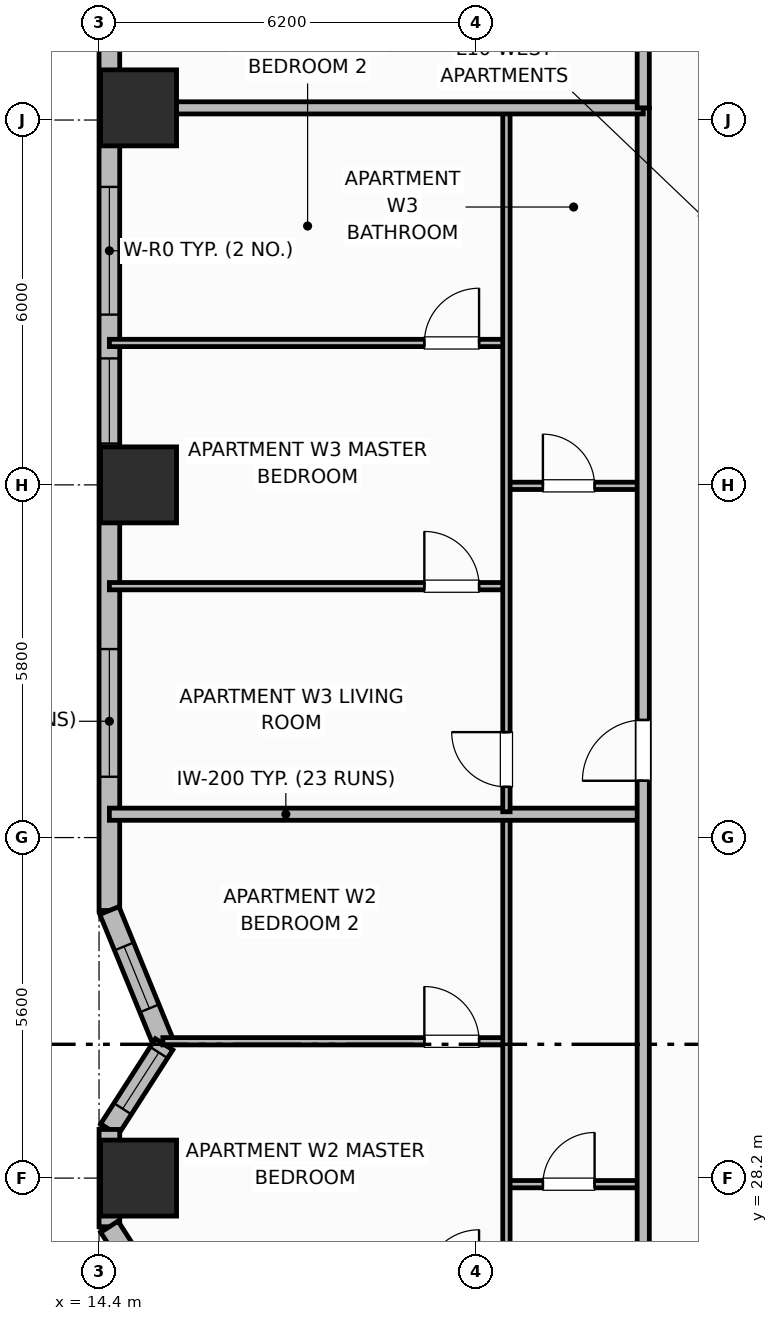
"""IFC4 building model, lengths in metres.
Left out: names, types, materials, properties, quantities, classifications, styles, units other than length and angle.
Written with IfcOpenShell. Run it as: python <this file> out.ifc"""

import sys

from ifc_helpers import new_model, si_unit, direction, frame, frame_2d, origin, origin_2d, place, context, subcontext, project, spatial, rectangle, extrude, element, fill, save


model = new_model("IFC4")
c1 = context("Model", 3, precision=1e-05, world=origin(), true_north=direction((0.0, 1.0)))
c2 = subcontext(c1, "Body", "Model", "MODEL_VIEW")
j1 = project(units=[si_unit("LENGTHUNIT", "METRE"), si_unit("PLANEANGLEUNIT", "RADIAN")], contexts=[c1])
p1 = place(None, origin())
s1 = spatial("IfcSite", under=j1, at=p1, CompositionType="ELEMENT")
p2 = place(p1, origin())
s2 = spatial("IfcBuilding", under=s1, at=p2, CompositionType="ELEMENT")
p3 = place(p2, frame((0.0, 0.0, 43.6)))
s3 = spatial("IfcBuildingStorey", under=s2, at=p3, CompositionType="ELEMENT", Elevation=43.6)
for number, where, z_axis, x_axis in (
    (1, (15.05, 28.2, 0.0), (0.0, 0.0, 1.0), (1.0, 0.0, 0.0)),
    (2, (15.05, 39.6, 0.0), (0.0, 0.0, 1.0), (1.0, 0.0, 0.0)),
    (3, (15.05, 45.8, 0.0), (0.0, 0.0, 1.0), (1.0, 0.0, 0.0)),
):
    element("IfcColumn", number, at=place(p3, frame(where, z_axis=z_axis, x_axis=x_axis)), inside=s3, PredefinedType="COLUMN", context=c2, shape_type="SweptSolid", body=[
        extrude(rectangle(XDim=1.25, YDim=1.25, at=origin_2d()), origin(), (0.0, 0.0, 1.0), 3.7),
    ])
p4 = place(p3, frame((14.57, 47.4, 0.0), z_axis=(0.0, 0.0, 1.0), x_axis=(0.0, -1.0, 0.0)))
e4 = element("IfcWall", 4, at=p4, inside=s3, PredefinedType="SOLIDWALL", context=c2, shape_type="SweptSolid", body=[
    extrude(rectangle(XDim=14.8, YDim=0.34, at=frame_2d((7.4, 0.0))), origin(), (0.0, 0.0, 1.0), 2.7),
])
p5 = place(p4, frame((2.9, 0.0, 0.68)))
e5 = element("IfcOpeningElement", 5, at=p5, cuts=e4, PredefinedType="OPENING", context=c2, shape_type="SweptSolid", body=[
    extrude(rectangle(XDim=2.1, YDim=1.9, at=frame_2d((1.05, 0.95))), frame((0.0, 0.18, 0.0), z_axis=(0.0, -1.0, 0.0), x_axis=(1.0, 0.0, 0.0)), (0.0, 0.0, 1.0), 0.36),
])
p6 = place(p4, frame((5.72, 0.0, 0.69)))
e6 = element("IfcOpeningElement", 6, at=p6, cuts=e4, PredefinedType="OPENING", context=c2, shape_type="SweptSolid", body=[
    extrude(rectangle(XDim=1.4, YDim=1.85, at=frame_2d((0.7, 0.925))), frame((0.0, 0.18, 0.0), z_axis=(0.0, -1.0, 0.0), x_axis=(1.0, 0.0, 0.0)), (0.0, 0.0, 1.0), 0.36),
])
p7 = place(p4, frame((10.5, 0.0, 0.68)))
e7 = element("IfcOpeningElement", 7, at=p7, cuts=e4, PredefinedType="OPENING", context=c2, shape_type="SweptSolid", body=[
    extrude(rectangle(XDim=2.1, YDim=1.9, at=frame_2d((1.05, 0.95))), frame((0.0, 0.18, 0.0), z_axis=(0.0, -1.0, 0.0), x_axis=(1.0, 0.0, 0.0)), (0.0, 0.0, 1.0), 0.36),
])
p8 = place(p3, frame((14.57, 32.6, 0.0), z_axis=(0.0, 0.0, 1.0), x_axis=(0.378568858991, -0.925573130013, 0.0)))
e8 = element("IfcWall", 8, at=p8, inside=s3, PredefinedType="SOLIDWALL", context=c2, shape_type="SweptSolid", body=[
    extrude(rectangle(XDim=2.377, YDim=0.34, at=frame_2d((1.188, 0.0))), origin(), (0.0, 0.0, 1.0), 2.7),
])
p9 = place(p8, frame((0.638, 0.0, 0.89)))
e9 = element("IfcOpeningElement", 9, at=p9, cuts=e8, PredefinedType="OPENING", context=c2, shape_type="SweptSolid", body=[
    extrude(rectangle(XDim=1.1, YDim=1.65, at=frame_2d((0.55, 0.825))), frame((0.0, 0.18, 0.0), z_axis=(0.0, -1.0, 0.0), x_axis=(1.0, 0.0, 0.0)), (0.0, 0.0, 1.0), 0.36),
])
p10 = place(p3, frame((15.47, 30.4, 0.0), z_axis=(0.0, 0.0, 1.0), x_axis=(-0.540742762169, -0.841188008214, 0.0)))
e10 = element("IfcWall", 10, at=p10, inside=s3, PredefinedType="SOLIDWALL", context=c2, shape_type="SweptSolid", body=[
    extrude(rectangle(XDim=1.664, YDim=0.34, at=frame_2d((0.832, 0.0))), origin(), (0.0, 0.0, 1.0), 2.7),
])
p11 = place(p10, frame((0.16, 0.0, 0.89)))
e11 = element("IfcOpeningElement", 11, at=p11, cuts=e10, PredefinedType="OPENING", context=c2, shape_type="SweptSolid", body=[
    extrude(rectangle(XDim=1.1, YDim=1.65, at=frame_2d((0.55, 0.825))), frame((0.0, 0.18, 0.0), z_axis=(0.0, -1.0, 0.0), x_axis=(1.0, 0.0, 0.0)), (0.0, 0.0, 1.0), 0.36),
])
p12 = place(p3, frame((14.57, 29.0, 0.0), z_axis=(0.0, 0.0, 1.0), x_axis=(0.0, -1.0, 0.0)))
e12 = element("IfcWall", 12, at=p12, inside=s3, PredefinedType="SOLIDWALL", context=c2, shape_type="SweptSolid", body=[
    extrude(rectangle(XDim=1.6, YDim=0.34, at=frame_2d((0.8, 0.0))), origin(), (0.0, 0.0, 1.0), 2.7),
])
p13 = place(p3, frame((14.57, 27.4, 0.0), z_axis=(0.0, 0.0, 1.0), x_axis=(0.540742762169, -0.841188008214, 0.0)))
e13 = element("IfcWall", 13, at=p13, inside=s3, PredefinedType="SOLIDWALL", context=c2, shape_type="SweptSolid", body=[
    extrude(rectangle(XDim=1.664, YDim=0.34, at=frame_2d((0.832, 0.0))), origin(), (0.0, 0.0, 1.0), 2.7),
])
p14 = place(p3, frame((21.1, 28.1, 0.0), z_axis=(0.0, 0.0, 1.0), x_axis=(1.0, 0.0, 0.0)))
e14 = element("IfcWall", 14, at=p14, inside=s3, PredefinedType="PARTITIONING", context=c2, shape_type="SweptSolid", body=[
    extrude(rectangle(XDim=2.25, YDim=0.12, at=frame_2d((1.125, 0.0))), origin(), (0.0, 0.0, 1.0), 2.53),
])
p15 = place(p14, frame((0.6, 0.0, 0.0)))
e15 = element("IfcOpeningElement", 15, at=p15, cuts=e14, PredefinedType="OPENING", context=c2, shape_type="SweptSolid", body=[
    extrude(rectangle(XDim=0.85, YDim=2.1, at=frame_2d((0.425, 1.05))), frame((0.0, 0.07, 0.0), z_axis=(0.0, -1.0, 0.0), x_axis=(1.0, 0.0, 0.0)), (0.0, 0.0, 1.0), 0.14),
])
p16 = place(p3, frame((15.449, 30.45, 0.0), z_axis=(0.0, 0.0, 1.0), x_axis=(1.0, 0.0, 0.0)))
e16 = element("IfcWall", 16, at=p16, inside=s3, PredefinedType="PARTITIONING", context=c2, shape_type="SweptSolid", body=[
    extrude(rectangle(XDim=5.651, YDim=0.12, at=frame_2d((2.825, 0.0))), origin(), (0.0, 0.0, 1.0), 2.53),
])
p17 = place(p16, frame((4.301, 0.0, 0.0)))
e17 = element("IfcOpeningElement", 17, at=p17, cuts=e16, PredefinedType="OPENING", context=c2, shape_type="SweptSolid", body=[
    extrude(rectangle(XDim=0.9, YDim=2.1, at=frame_2d((0.45, 1.05))), frame((0.0, 0.07, 0.0), z_axis=(0.0, -1.0, 0.0), x_axis=(1.0, 0.0, 0.0)), (0.0, 0.0, 1.0), 0.14),
])
p18 = place(p3, frame((21.1, 22.74, 0.0), z_axis=(0.0, 0.0, 1.0), x_axis=(0.0, 1.0, 0.0)))
e18 = element("IfcWall", 18, at=p18, inside=s3, PredefinedType="PARTITIONING", context=c2, shape_type="SweptSolid", body=[
    extrude(rectangle(XDim=11.404, YDim=0.12, at=frame_2d((5.702, 0.0))), origin(), (0.0, 0.0, 1.0), 2.53),
])
p19 = place(p18, frame((0.41, 0.0, 0.0)))
e19 = element("IfcOpeningElement", 19, at=p19, cuts=e18, PredefinedType="OPENING", context=c2, shape_type="SweptSolid", body=[
    extrude(rectangle(XDim=0.9, YDim=2.1, at=frame_2d((0.45, 1.05))), frame((0.0, 0.07, 0.0), z_axis=(0.0, -1.0, 0.0), x_axis=(1.0, 0.0, 0.0)), (0.0, 0.0, 1.0), 0.14),
])
p20 = place(p3, frame((14.57, 34.184, 0.0), z_axis=(0.0, 0.0, 1.0), x_axis=(1.0, 0.0, 0.0)))
e20 = element("IfcWall", 20, at=p20, inside=s3, PredefinedType="PARTITIONING", context=c2, shape_type="SweptSolid", body=[
    extrude(rectangle(XDim=8.78, YDim=0.2, at=frame_2d((4.39, 0.0))), origin(), (0.0, 0.0, 1.0), 2.53),
])
p21 = place(p3, frame((21.1, 39.584, 0.0), z_axis=(0.0, 0.0, 1.0), x_axis=(1.0, 0.0, 0.0)))
e21 = element("IfcWall", 21, at=p21, inside=s3, PredefinedType="PARTITIONING", context=c2, shape_type="SweptSolid", body=[
    extrude(rectangle(XDim=2.25, YDim=0.12, at=frame_2d((1.125, 0.0))), origin(), (0.0, 0.0, 1.0), 2.53),
])
p22 = place(p21, frame((0.6, 0.0, 0.0)))
e22 = element("IfcOpeningElement", 22, at=p22, cuts=e21, PredefinedType="OPENING", context=c2, shape_type="SweptSolid", body=[
    extrude(rectangle(XDim=0.85, YDim=2.1, at=frame_2d((0.425, 1.05))), frame((0.0, 0.07, 0.0), z_axis=(0.0, -1.0, 0.0), x_axis=(1.0, 0.0, 0.0)), (0.0, 0.0, 1.0), 0.14),
])
p23 = place(p3, frame((14.57, 37.934, 0.0), z_axis=(0.0, 0.0, 1.0), x_axis=(1.0, 0.0, 0.0)))
e23 = element("IfcWall", 23, at=p23, inside=s3, PredefinedType="PARTITIONING", context=c2, shape_type="SweptSolid", body=[
    extrude(rectangle(XDim=6.53, YDim=0.12, at=frame_2d((3.265, 0.0))), origin(), (0.0, 0.0, 1.0), 2.53),
])
p24 = place(p23, frame((5.18, 0.0, 0.0)))
e24 = element("IfcOpeningElement", 24, at=p24, cuts=e23, PredefinedType="OPENING", context=c2, shape_type="SweptSolid", body=[
    extrude(rectangle(XDim=0.9, YDim=2.1, at=frame_2d((0.45, 1.05))), frame((0.0, 0.07, 0.0), z_axis=(0.0, -1.0, 0.0), x_axis=(1.0, 0.0, 0.0)), (0.0, 0.0, 1.0), 0.14),
])
p25 = place(p3, frame((14.57, 41.934, 0.0), z_axis=(0.0, 0.0, 1.0), x_axis=(1.0, 0.0, 0.0)))
e25 = element("IfcWall", 25, at=p25, inside=s3, PredefinedType="PARTITIONING", context=c2, shape_type="SweptSolid", body=[
    extrude(rectangle(XDim=6.53, YDim=0.12, at=frame_2d((3.265, 0.0))), origin(), (0.0, 0.0, 1.0), 2.53),
])
p26 = place(p25, frame((5.18, 0.0, 0.0)))
e26 = element("IfcOpeningElement", 26, at=p26, cuts=e25, PredefinedType="OPENING", context=c2, shape_type="SweptSolid", body=[
    extrude(rectangle(XDim=0.9, YDim=2.1, at=frame_2d((0.45, 1.05))), frame((0.0, 0.07, 0.0), z_axis=(0.0, -1.0, 0.0), x_axis=(1.0, 0.0, 0.0)), (0.0, 0.0, 1.0), 0.14),
])
p27 = place(p3, frame((21.1, 34.224, 0.0), z_axis=(0.0, 0.0, 1.0), x_axis=(0.0, 1.0, 0.0)))
e27 = element("IfcWall", 27, at=p27, inside=s3, PredefinedType="PARTITIONING", context=c2, shape_type="SweptSolid", body=[
    extrude(rectangle(XDim=11.536, YDim=0.12, at=frame_2d((5.768, 0.0))), origin(), (0.0, 0.0, 1.0), 2.53),
])
p28 = place(p27, frame((0.41, 0.0, 0.0)))
e28 = element("IfcOpeningElement", 28, at=p28, cuts=e27, PredefinedType="OPENING", context=c2, shape_type="SweptSolid", body=[
    extrude(rectangle(XDim=0.9, YDim=2.1, at=frame_2d((0.45, 1.05))), frame((0.0, 0.07, 0.0), z_axis=(0.0, -1.0, 0.0), x_axis=(1.0, 0.0, 0.0)), (0.0, 0.0, 1.0), 0.14),
])
p29 = place(p3, frame((23.35, 10.6, 0.0), z_axis=(0.0, 0.0, 1.0), x_axis=(0.0, 1.0, 0.0)))
e29 = element("IfcWall", 29, at=p29, inside=s3, PredefinedType="PARTITIONING", context=c2, shape_type="SweptSolid", body=[
    extrude(rectangle(XDim=35.2, YDim=0.2, at=frame_2d((17.6, 0.0))), origin(), (0.0, 0.0, 1.0), 2.53),
])
p30 = place(p29, frame((2.65, 0.0, 0.0)))
e30 = element("IfcOpeningElement", 30, at=p30, cuts=e29, PredefinedType="OPENING", context=c2, shape_type="SweptSolid", body=[
    extrude(rectangle(XDim=1.0, YDim=2.15, at=frame_2d((0.5, 1.075))), frame((0.0, 0.11, 0.0), z_axis=(0.0, -1.0, 0.0), x_axis=(1.0, 0.0, 0.0)), (0.0, 0.0, 1.0), 0.22),
])
p31 = place(p29, frame((12.65, 0.0, 0.0)))
e31 = element("IfcOpeningElement", 31, at=p31, cuts=e29, PredefinedType="OPENING", context=c2, shape_type="SweptSolid", body=[
    extrude(rectangle(XDim=1.0, YDim=2.15, at=frame_2d((0.5, 1.075))), frame((0.0, 0.11, 0.0), z_axis=(0.0, -1.0, 0.0), x_axis=(1.0, 0.0, 0.0)), (0.0, 0.0, 1.0), 0.22),
])
p32 = place(p29, frame((24.134, 0.0, 0.0)))
e32 = element("IfcOpeningElement", 32, at=p32, cuts=e29, PredefinedType="OPENING", context=c2, shape_type="SweptSolid", body=[
    extrude(rectangle(XDim=1.0, YDim=2.15, at=frame_2d((0.5, 1.075))), frame((0.0, 0.11, 0.0), z_axis=(0.0, -1.0, 0.0), x_axis=(1.0, 0.0, 0.0)), (0.0, 0.0, 1.0), 0.22),
])
p33 = place(p3, frame((14.99, 45.8, 0.0), z_axis=(0.0, 0.0, 1.0), x_axis=(1.0, 0.0, 0.0)))
e33 = element("IfcWall", 33, at=p33, inside=s3, PredefinedType="PARTITIONING", context=c2, shape_type="SweptSolid", body=[
    extrude(rectangle(XDim=8.36, YDim=0.2, at=frame_2d((4.18, 0.0))), origin(), (0.0, 0.0, 1.0), 2.53),
])
p34 = place(p3, frame((23.35, 45.8, 0.0), z_axis=(0.0, 0.0, 1.0), x_axis=(0.0, 1.0, 0.0)))
e34 = element("IfcWall", 34, at=p34, inside=s3, PredefinedType="PARTITIONING", context=c2, shape_type="SweptSolid", body=[
    extrude(rectangle(XDim=5.63, YDim=0.2, at=frame_2d((2.815, 0.0))), origin(), (0.0, 0.0, 1.0), 2.53),
])
p35 = place(p5, origin())
e35 = element("IfcWindow", 35, at=p35, inside=s3, PartitioningType="SINGLE_PANEL", PredefinedType="WINDOW", context=c2, shape_type="SweptSolid", body=[
    extrude(rectangle(XDim=2.1, YDim=1.9, at=frame_2d((1.05, 0.95))), frame((0.0, 0.03, 0.0), z_axis=(0.0, -1.0, 0.0), x_axis=(1.0, 0.0, 0.0)), (0.0, 0.0, 1.0), 0.06),
])
fill(e5, e35)
p36 = place(p6, origin())
e36 = element("IfcWindow", 36, at=p36, inside=s3, PartitioningType="SINGLE_PANEL", PredefinedType="WINDOW", context=c2, shape_type="SweptSolid", body=[
    extrude(rectangle(XDim=1.4, YDim=1.85, at=frame_2d((0.7, 0.925))), frame((0.0, 0.03, 0.0), z_axis=(0.0, -1.0, 0.0), x_axis=(1.0, 0.0, 0.0)), (0.0, 0.0, 1.0), 0.06),
])
fill(e6, e36)
p37 = place(p7, origin())
e37 = element("IfcWindow", 37, at=p37, inside=s3, PartitioningType="SINGLE_PANEL", PredefinedType="WINDOW", context=c2, shape_type="SweptSolid", body=[
    extrude(rectangle(XDim=2.1, YDim=1.9, at=frame_2d((1.05, 0.95))), frame((0.0, 0.03, 0.0), z_axis=(0.0, -1.0, 0.0), x_axis=(1.0, 0.0, 0.0)), (0.0, 0.0, 1.0), 0.06),
])
fill(e7, e37)
p38 = place(p9, origin())
e38 = element("IfcWindow", 38, at=p38, inside=s3, PartitioningType="SINGLE_PANEL", PredefinedType="WINDOW", context=c2, shape_type="SweptSolid", body=[
    extrude(rectangle(XDim=1.1, YDim=1.65, at=frame_2d((0.55, 0.825))), frame((0.0, 0.03, 0.0), z_axis=(0.0, -1.0, 0.0), x_axis=(1.0, 0.0, 0.0)), (0.0, 0.0, 1.0), 0.06),
])
fill(e9, e38)
p39 = place(p11, origin())
e39 = element("IfcWindow", 39, at=p39, inside=s3, PartitioningType="SINGLE_PANEL", PredefinedType="WINDOW", context=c2, shape_type="SweptSolid", body=[
    extrude(rectangle(XDim=1.1, YDim=1.65, at=frame_2d((0.55, 0.825))), frame((0.0, 0.03, 0.0), z_axis=(0.0, -1.0, 0.0), x_axis=(1.0, 0.0, 0.0)), (0.0, 0.0, 1.0), 0.06),
])
fill(e11, e39)
p40 = place(p15, origin())
e40 = element("IfcDoor", 40, at=p40, inside=s3, OperationType="SINGLE_SWING_RIGHT", PredefinedType="DOOR", context=c2, shape_type="SweptSolid", body=[
    extrude(rectangle(XDim=0.85, YDim=2.1, at=frame_2d((0.425, 1.05))), frame((0.0, 0.025, 0.0), z_axis=(0.0, -1.0, 0.0), x_axis=(1.0, 0.0, 0.0)), (0.0, 0.0, 1.0), 0.05),
])
fill(e15, e40)
p41 = place(p17, origin())
e41 = element("IfcDoor", 41, at=p41, inside=s3, OperationType="SINGLE_SWING_LEFT", PredefinedType="DOOR", context=c2, shape_type="SweptSolid", body=[
    extrude(rectangle(XDim=0.9, YDim=2.1, at=frame_2d((0.45, 1.05))), frame((0.0, 0.025, 0.0), z_axis=(0.0, -1.0, 0.0), x_axis=(1.0, 0.0, 0.0)), (0.0, 0.0, 1.0), 0.05),
])
fill(e17, e41)
p42 = place(p22, origin())
e42 = element("IfcDoor", 42, at=p42, inside=s3, OperationType="SINGLE_SWING_LEFT", PredefinedType="DOOR", context=c2, shape_type="SweptSolid", body=[
    extrude(rectangle(XDim=0.85, YDim=2.1, at=frame_2d((0.425, 1.05))), frame((0.0, 0.025, 0.0), z_axis=(0.0, -1.0, 0.0), x_axis=(1.0, 0.0, 0.0)), (0.0, 0.0, 1.0), 0.05),
])
fill(e22, e42)
p43 = place(p24, origin())
e43 = element("IfcDoor", 43, at=p43, inside=s3, OperationType="SINGLE_SWING_LEFT", PredefinedType="DOOR", context=c2, shape_type="SweptSolid", body=[
    extrude(rectangle(XDim=0.9, YDim=2.1, at=frame_2d((0.45, 1.05))), frame((0.0, 0.025, 0.0), z_axis=(0.0, -1.0, 0.0), x_axis=(1.0, 0.0, 0.0)), (0.0, 0.0, 1.0), 0.05),
])
fill(e24, e43)
p44 = place(p26, origin())
e44 = element("IfcDoor", 44, at=p44, inside=s3, OperationType="SINGLE_SWING_RIGHT", PredefinedType="DOOR", context=c2, shape_type="SweptSolid", body=[
    extrude(rectangle(XDim=0.9, YDim=2.1, at=frame_2d((0.45, 1.05))), frame((0.0, 0.025, 0.0), z_axis=(0.0, -1.0, 0.0), x_axis=(1.0, 0.0, 0.0)), (0.0, 0.0, 1.0), 0.05),
])
fill(e26, e44)
p45 = place(p28, origin())
e45 = element("IfcDoor", 45, at=p45, inside=s3, OperationType="SINGLE_SWING_RIGHT", PredefinedType="DOOR", context=c2, shape_type="SweptSolid", body=[
    extrude(rectangle(XDim=0.9, YDim=2.1, at=frame_2d((0.45, 1.05))), frame((0.0, 0.025, 0.0), z_axis=(0.0, -1.0, 0.0), x_axis=(1.0, 0.0, 0.0)), (0.0, 0.0, 1.0), 0.05),
])
fill(e28, e45)
p46 = place(p32, origin())
e46 = element("IfcDoor", 46, at=p46, inside=s3, OperationType="SINGLE_SWING_LEFT", PredefinedType="DOOR", context=c2, shape_type="SweptSolid", body=[
    extrude(rectangle(XDim=1.0, YDim=2.15, at=frame_2d((0.5, 1.075))), frame((0.0, 0.025, 0.0), z_axis=(0.0, -1.0, 0.0), x_axis=(1.0, 0.0, 0.0)), (0.0, 0.0, 1.0), 0.05),
])
fill(e32, e46)
save(model, sys.argv[1])
